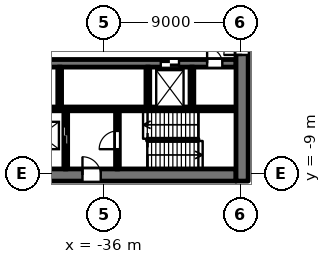
"""IFC4 building model, lengths in metres.
Left out: names, types, materials, properties, quantities, classifications, styles, units other than length and angle.
Written with IfcOpenShell. Run it as: python <this file> out.ifc"""

import sys

from ifc_helpers import new_model, si_unit, direction, frame, frame_2d, origin, place, context, subcontext, project, spatial, rectangle, extrude, element, fill, save


model = new_model("IFC4")
c1 = context("Model", 3, precision=1e-05, world=origin(), true_north=direction((0.0, 1.0)))
c2 = subcontext(c1, "Body", "Model", "MODEL_VIEW")
j1 = project(units=[si_unit("LENGTHUNIT", "METRE"), si_unit("PLANEANGLEUNIT", "RADIAN")], contexts=[c1])
p1 = place(None, origin())
s1 = spatial("IfcSite", under=j1, at=p1, CompositionType="ELEMENT")
p2 = place(p1, origin())
s2 = spatial("IfcBuilding", under=s1, at=p2, CompositionType="ELEMENT")
p3 = place(p2, frame((0.0, 0.0, -4.5)))
s3 = spatial("IfcBuildingStorey", under=s2, at=p3, CompositionType="ELEMENT", Elevation=-4.5)
p4 = place(p3, frame((-44.7, -9.1, 0.0), z_axis=(0.0, 0.0, 1.0), x_axis=(1.0, 0.0, 0.0)))
e1 = element("IfcWall", 1, at=p4, inside=s3, PredefinedType="SHEAR", context=c2, shape_type="SweptSolid", body=[
    extrude(rectangle(XDim=17.4, YDim=0.8, at=frame_2d((8.7, 0.0))), origin(), (0.0, 0.0, 1.0), 4.2),
])
p5 = place(p4, frame((7.3, 0.0, 0.0)))
e2 = element("IfcOpeningElement", 2, at=p5, cuts=e1, PredefinedType="OPENING", context=c2, shape_type="SweptSolid", body=[
    extrude(rectangle(XDim=1.2, YDim=2.1, at=frame_2d((0.6, 1.05))), frame((0.0, 0.41, 0.0), z_axis=(0.0, -1.0, 0.0), x_axis=(1.0, 0.0, 0.0)), (0.0, 0.0, 1.0), 0.82),
])
p6 = place(p4, frame((0.15, 0.0, 0.0)))
e3 = element("IfcOpeningElement", 3, at=p6, cuts=e1, PredefinedType="OPENING", context=c2, shape_type="SweptSolid", body=[
    extrude(rectangle(XDim=0.9, YDim=2.1, at=frame_2d((0.45, 1.05))), frame((0.0, 0.41, 0.0), z_axis=(0.0, -1.0, 0.0), x_axis=(1.0, 0.0, 0.0)), (0.0, 0.0, 1.0), 0.82),
])
p7 = place(p4, frame((1.65, 0.0, 0.0)))
e4 = element("IfcOpeningElement", 4, at=p7, cuts=e1, PredefinedType="OPENING", context=c2, shape_type="SweptSolid", body=[
    extrude(rectangle(XDim=0.9, YDim=2.1, at=frame_2d((0.45, 1.05))), frame((0.0, 0.41, 0.0), z_axis=(0.0, -1.0, 0.0), x_axis=(1.0, 0.0, 0.0)), (0.0, 0.0, 1.0), 0.82),
])
p8 = place(p3, frame((-44.7, -4.75, 0.0), z_axis=(0.0, 0.0, 1.0), x_axis=(1.0, 0.0, 0.0)))
e5 = element("IfcWall", 5, at=p8, inside=s3, PredefinedType="SHEAR", context=c2, shape_type="SweptSolid", body=[
    extrude(rectangle(XDim=17.4, YDim=0.25, at=frame_2d((8.7, 0.0))), origin(), (0.0, 0.0, 1.0), 4.2),
])
p9 = place(p3, frame((-44.7, -1.75, 0.0), z_axis=(0.0, 0.0, 1.0), x_axis=(1.0, 0.0, 0.0)))
e6 = element("IfcWall", 6, at=p9, inside=s3, PredefinedType="SHEAR", context=c2, shape_type="SweptSolid", body=[
    extrude(rectangle(XDim=17.4, YDim=0.5, at=frame_2d((8.7, 0.0))), origin(), (0.0, 0.0, 1.0), 4.2),
])
p10 = place(p9, frame((12.45, 0.0, 0.0)))
e7 = element("IfcOpeningElement", 7, at=p10, cuts=e6, PredefinedType="OPENING", context=c2, shape_type="SweptSolid", body=[
    extrude(rectangle(XDim=1.2, YDim=2.1, at=frame_2d((0.6, 1.05))), frame((0.0, 0.26, 0.0), z_axis=(0.0, -1.0, 0.0), x_axis=(1.0, 0.0, 0.0)), (0.0, 0.0, 1.0), 0.52),
])
p11 = place(p9, frame((15.5, 0.0, 0.0)))
e8 = element("IfcOpeningElement", 8, at=p11, cuts=e6, PredefinedType="OPENING", context=c2, shape_type="SweptSolid", body=[
    extrude(rectangle(XDim=1.0, YDim=2.1, at=frame_2d((0.5, 1.05))), frame((0.0, 0.26, 0.0), z_axis=(0.0, -1.0, 0.0), x_axis=(1.0, 0.0, 0.0)), (0.0, 0.0, 1.0), 0.52),
])
p12 = place(p3, frame((-38.9, -4.625, 0.0), z_axis=(0.0, 0.0, 1.0), x_axis=(0.0, 1.0, 0.0)))
e9 = element("IfcWall", 9, at=p12, inside=s3, PredefinedType="SHEAR", context=c2, shape_type="SweptSolid", body=[
    extrude(rectangle(XDim=2.625, YDim=0.25, at=frame_2d((1.312, 0.0))), origin(), (0.0, 0.0, 1.0), 4.2),
])
p13 = place(p3, frame((-38.5, -8.7, 0.0), z_axis=(0.0, 0.0, 1.0), x_axis=(0.0, 1.0, 0.0)))
e10 = element("IfcWall", 10, at=p13, inside=s3, PredefinedType="SHEAR", context=c2, shape_type="SweptSolid", body=[
    extrude(rectangle(XDim=3.825, YDim=0.25, at=frame_2d((1.913, 0.0))), origin(), (0.0, 0.0, 1.0), 4.2),
])
p14 = place(p13, frame((1.6, 0.0, 0.0)))
e11 = element("IfcOpeningElement", 11, at=p14, cuts=e10, PredefinedType="OPENING", context=c2, shape_type="SweptSolid", body=[
    extrude(rectangle(XDim=1.2, YDim=2.1, at=frame_2d((0.6, 1.05))), frame((0.0, 0.135, 0.0), z_axis=(0.0, -1.0, 0.0), x_axis=(1.0, 0.0, 0.0)), (0.0, 0.0, 1.0), 0.27),
])
p15 = place(p3, frame((-35.1, -8.7, 0.0), z_axis=(0.0, 0.0, 1.0), x_axis=(0.0, 1.0, 0.0)))
e12 = element("IfcWall", 12, at=p15, inside=s3, PredefinedType="SHEAR", context=c2, shape_type="SweptSolid", body=[
    extrude(rectangle(XDim=3.825, YDim=0.25, at=frame_2d((1.913, 0.0))), origin(), (0.0, 0.0, 1.0), 4.2),
])
p16 = place(p15, frame((1.3, 0.0, 0.0)))
e13 = element("IfcOpeningElement", 13, at=p16, cuts=e12, PredefinedType="OPENING", context=c2, shape_type="SweptSolid", body=[
    extrude(rectangle(XDim=1.2, YDim=2.1, at=frame_2d((0.6, 1.05))), frame((0.0, 0.135, 0.0), z_axis=(0.0, -1.0, 0.0), x_axis=(1.0, 0.0, 0.0)), (0.0, 0.0, 1.0), 0.27),
])
for number, where, z_axis, x_axis in (
    (14, (-33.1, -4.625, 0.0), (0.0, 0.0, 1.0), (0.0, 1.0, 0.0)),
    (15, (-30.2, -4.625, 0.0), (0.0, 0.0, 1.0), (0.0, 1.0, 0.0)),
):
    element("IfcWall", number, at=place(p3, frame(where, z_axis=z_axis, x_axis=x_axis)), inside=s3, PredefinedType="SHEAR", context=c2, shape_type="SweptSolid", body=[
        extrude(rectangle(XDim=2.625, YDim=0.25, at=frame_2d((1.312, 0.0))), origin(), (0.0, 0.0, 1.0), 4.2),
    ])
p17 = place(p3, frame((-26.9, -9.5, 0.0), z_axis=(0.0, 0.0, 1.0), x_axis=(0.0, 1.0, 0.0)))
e16 = element("IfcWall", 16, at=p17, inside=s3, PredefinedType="SHEAR", context=c2, shape_type="SweptSolid", body=[
    extrude(rectangle(XDim=19.0, YDim=0.8, at=frame_2d((9.5, 0.0))), origin(), (0.0, 0.0, 1.0), 4.2),
])
p18 = place(p17, frame((8.3, 0.0, 0.0)))
e17 = element("IfcOpeningElement", 17, at=p18, cuts=e16, PredefinedType="OPENING", context=c2, shape_type="SweptSolid", body=[
    extrude(rectangle(XDim=2.4, YDim=2.1, at=frame_2d((1.2, 1.05))), frame((0.0, 0.41, 0.0), z_axis=(0.0, -1.0, 0.0), x_axis=(1.0, 0.0, 0.0)), (0.0, 0.0, 1.0), 0.82),
])
p19 = place(p18, origin())
e18 = element("IfcDoor", 18, at=p19, inside=s3, OperationType="DOUBLE_DOOR_SINGLE_SWING", PredefinedType="DOOR", context=c2, shape_type="SweptSolid", body=[
    extrude(rectangle(XDim=2.4, YDim=2.1, at=frame_2d((1.2, 1.05))), frame((0.0, 0.275, 0.0), z_axis=(0.0, -1.0, 0.0), x_axis=(1.0, 0.0, 0.0)), (0.0, 0.0, 1.0), 0.05),
])
fill(e17, e18)
p20 = place(p10, origin())
e19 = element("IfcDoor", 19, at=p20, inside=s3, OperationType="SLIDING_TO_LEFT", PredefinedType="DOOR", context=c2, shape_type="SweptSolid", body=[
    extrude(rectangle(XDim=1.2, YDim=2.1, at=frame_2d((0.6, 1.05))), frame((0.0, 0.025, 0.0), z_axis=(0.0, -1.0, 0.0), x_axis=(1.0, 0.0, 0.0)), (0.0, 0.0, 1.0), 0.05),
])
fill(e7, e19)
p21 = place(p14, origin())
e20 = element("IfcDoor", 20, at=p21, inside=s3, OperationType="SLIDING_TO_LEFT", PredefinedType="DOOR", context=c2, shape_type="SweptSolid", body=[
    extrude(rectangle(XDim=1.2, YDim=2.1, at=frame_2d((0.6, 1.05))), frame((0.0, 0.025, 0.0), z_axis=(0.0, -1.0, 0.0), x_axis=(1.0, 0.0, 0.0)), (0.0, 0.0, 1.0), 0.05),
])
fill(e11, e20)
p22 = place(p11, origin())
e21 = element("IfcDoor", 21, at=p22, inside=s3, OperationType="SINGLE_SWING_LEFT", PredefinedType="DOOR", context=c2, shape_type="SweptSolid", body=[
    extrude(rectangle(XDim=1.0, YDim=2.1, at=frame_2d((0.5, 1.05))), frame((0.0, 0.025, 0.0), z_axis=(0.0, -1.0, 0.0), x_axis=(1.0, 0.0, 0.0)), (0.0, 0.0, 1.0), 0.05),
])
fill(e8, e21)
p23 = place(p16, origin())
e22 = element("IfcDoor", 22, at=p23, inside=s3, OperationType="SINGLE_SWING_LEFT", PredefinedType="DOOR", context=c2, shape_type="SweptSolid", body=[
    extrude(rectangle(XDim=1.2, YDim=2.1, at=frame_2d((0.6, 1.05))), frame((0.0, 0.025, 0.0), z_axis=(0.0, -1.0, 0.0), x_axis=(1.0, 0.0, 0.0)), (0.0, 0.0, 1.0), 0.05),
])
fill(e13, e22)
p24 = place(p5, origin())
e23 = element("IfcDoor", 23, at=p24, inside=s3, OperationType="SINGLE_SWING_LEFT", PredefinedType="DOOR", context=c2, shape_type="SweptSolid", body=[
    extrude(rectangle(XDim=1.2, YDim=2.1, at=frame_2d((0.6, 1.05))), frame((0.0, 0.275, 0.0), z_axis=(0.0, -1.0, 0.0), x_axis=(1.0, 0.0, 0.0)), (0.0, 0.0, 1.0), 0.05),
])
fill(e2, e23)
save(model, sys.argv[1])
